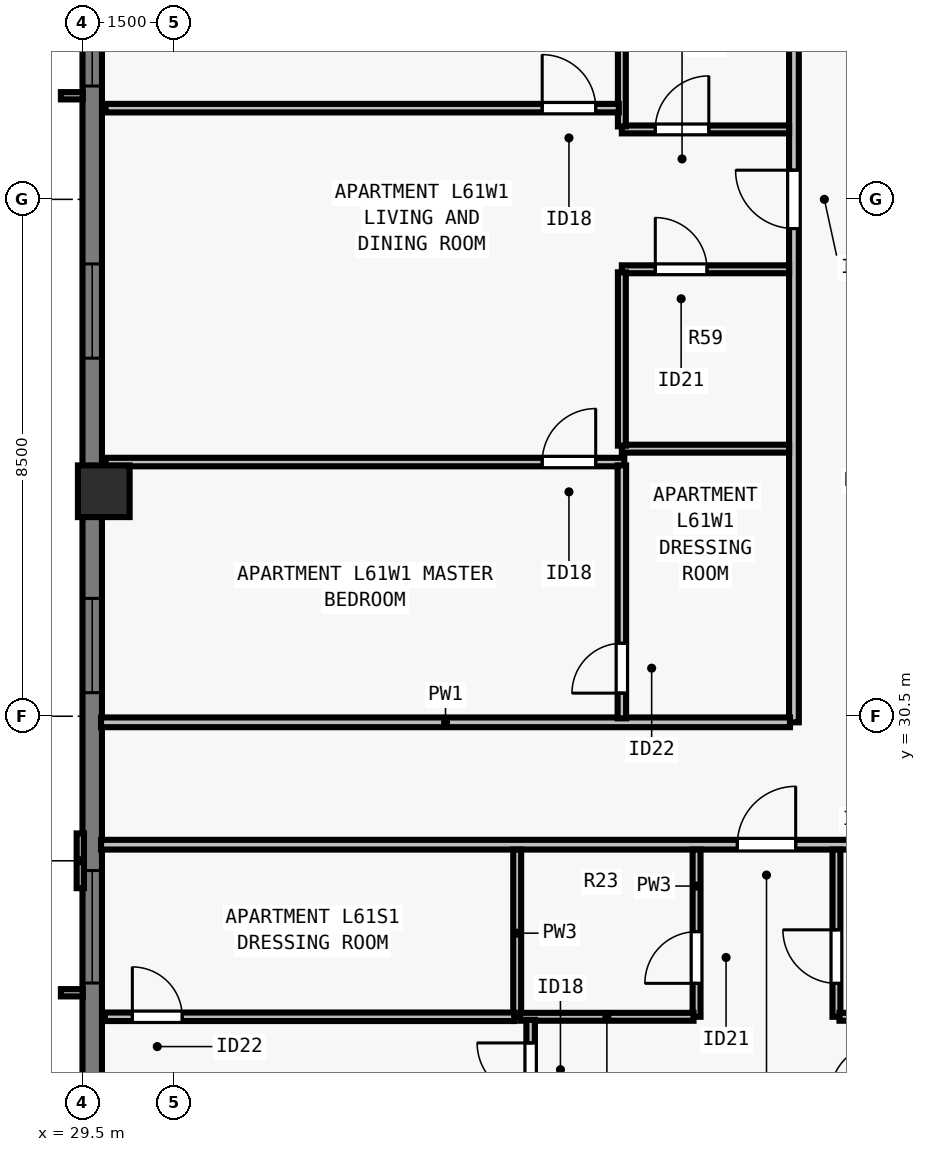
"""IFC4 building model, lengths in metres.
Left out: names, types, materials, properties, quantities, classifications, styles, units other than length and angle.
Written with IfcOpenShell. Run it as: python <this file> out.ifc"""

import sys

from ifc_helpers import new_model, si_unit, direction, frame, frame_2d, origin, origin_2d, place, context, subcontext, project, spatial, rectangle, extrude, element, fill, save


model = new_model("IFC4")
c1 = context("Model", 3, precision=1e-05, world=origin(), true_north=direction((0.0, 1.0)))
c2 = subcontext(c1, "Body", "Model", "MODEL_VIEW")
j1 = project(units=[si_unit("LENGTHUNIT", "METRE"), si_unit("PLANEANGLEUNIT", "RADIAN")], contexts=[c1])
p1 = place(None, origin())
s1 = spatial("IfcSite", under=j1, at=p1, CompositionType="ELEMENT")
p2 = place(p1, origin())
s2 = spatial("IfcBuilding", under=s1, at=p2, CompositionType="ELEMENT")
p3 = place(p2, frame((0.0, 0.0, 223.5)))
s3 = spatial("IfcBuildingStorey", under=s2, at=p3, CompositionType="ELEMENT", Elevation=223.5)
p4 = place(p3, frame((29.85, 34.2, 0.0), z_axis=(0.0, 0.0, 1.0), x_axis=(0.0, 1.0, 0.0)))
e1 = element("IfcColumn", 1, at=p4, inside=s3, PredefinedType="COLUMN", context=c2, shape_type="SweptSolid", body=[
    extrude(rectangle(XDim=0.85, YDim=0.85, at=origin_2d()), origin(), (0.0, 0.0, 1.0), 3.5),
])
p5 = place(p3, frame((29.66, 21.5, 0.0), z_axis=(0.0, 0.0, 1.0), x_axis=(0.0, 1.0, 0.0)))
e2 = element("IfcWall", 2, at=p5, inside=s3, PredefinedType="SOLIDWALL", context=c2, shape_type="SweptSolid", body=[
    extrude(rectangle(XDim=34.702, YDim=0.32, at=frame_2d((17.351, 0.0))), origin(), (0.0, 0.0, 1.0), 3.29),
])
p6 = place(p5, frame((4.613, 0.0, 0.8)))
e3 = element("IfcOpeningElement", 3, at=p6, cuts=e2, PredefinedType="OPENING", context=c2, shape_type="SweptSolid", body=[
    extrude(rectangle(XDim=1.85, YDim=1.678, at=frame_2d((0.925, 0.839))), frame((0.0, 0.17, 0.0), z_axis=(0.0, -1.0, 0.0), x_axis=(1.0, 0.0, 0.0)), (0.0, 0.0, 1.0), 0.34),
])
p7 = place(p5, frame((9.388, 0.0, 0.8)))
e4 = element("IfcOpeningElement", 4, at=p7, cuts=e2, PredefinedType="OPENING", context=c2, shape_type="SweptSolid", body=[
    extrude(rectangle(XDim=1.55, YDim=1.678, at=frame_2d((0.775, 0.839))), frame((0.0, 0.17, 0.0), z_axis=(0.0, -1.0, 0.0), x_axis=(1.0, 0.0, 0.0)), (0.0, 0.0, 1.0), 0.34),
])
p8 = place(p5, frame((14.888, 0.0, 0.8)))
e5 = element("IfcOpeningElement", 5, at=p8, cuts=e2, PredefinedType="OPENING", context=c2, shape_type="SweptSolid", body=[
    extrude(rectangle(XDim=1.55, YDim=1.678, at=frame_2d((0.775, 0.839))), frame((0.0, 0.17, 0.0), z_axis=(0.0, -1.0, 0.0), x_axis=(1.0, 0.0, 0.0)), (0.0, 0.0, 1.0), 0.34),
])
p9 = place(p5, frame((19.364, 0.0, 0.8)))
e6 = element("IfcOpeningElement", 6, at=p9, cuts=e2, PredefinedType="OPENING", context=c2, shape_type="SweptSolid", body=[
    extrude(rectangle(XDim=1.85, YDim=1.678, at=frame_2d((0.925, 0.839))), frame((0.0, 0.17, 0.0), z_axis=(0.0, -1.0, 0.0), x_axis=(1.0, 0.0, 0.0)), (0.0, 0.0, 1.0), 0.34),
])
p10 = place(p5, frame((23.614, 0.0, 0.8)))
e7 = element("IfcOpeningElement", 7, at=p10, cuts=e2, PredefinedType="OPENING", context=c2, shape_type="SweptSolid", body=[
    extrude(rectangle(XDim=1.85, YDim=1.678, at=frame_2d((0.925, 0.839))), frame((0.0, 0.17, 0.0), z_axis=(0.0, -1.0, 0.0), x_axis=(1.0, 0.0, 0.0)), (0.0, 0.0, 1.0), 0.34),
])
p11 = place(p5, frame((28.839, 0.0, 0.8)))
e8 = element("IfcOpeningElement", 8, at=p11, cuts=e2, PredefinedType="OPENING", context=c2, shape_type="SweptSolid", body=[
    extrude(rectangle(XDim=1.55, YDim=1.678, at=frame_2d((0.775, 0.839))), frame((0.0, 0.17, 0.0), z_axis=(0.0, -1.0, 0.0), x_axis=(1.0, 0.0, 0.0)), (0.0, 0.0, 1.0), 0.34),
])
p12 = place(p5, frame((31.35, 0.0, 0.8)))
e9 = element("IfcOpeningElement", 9, at=p12, cuts=e2, PredefinedType="OPENING", context=c2, shape_type="SweptSolid", body=[
    extrude(rectangle(XDim=0.9, YDim=1.678, at=frame_2d((0.45, 0.839))), frame((0.0, 0.17, 0.0), z_axis=(0.0, -1.0, 0.0), x_axis=(1.0, 0.0, 0.0)), (0.0, 0.0, 1.0), 0.34),
])
p13 = place(p3, frame((29.805, 28.387, 0.0), z_axis=(0.0, 0.0, 1.0), x_axis=(1.0, 0.0, 0.0)))
e10 = element("IfcWall", 10, at=p13, inside=s3, PredefinedType="PARTITIONING", context=c2, shape_type="SweptSolid", body=[
    extrude(rectangle(XDim=44.39, YDim=0.16, at=frame_2d((22.195, 0.0))), origin(), (0.0, 0.0, 1.0), 2.958),
])
p14 = place(p13, frame((10.464, 0.0, 0.0)))
e11 = element("IfcOpeningElement", 11, at=p14, cuts=e10, PredefinedType="OPENING", context=c2, shape_type="SweptSolid", body=[
    extrude(rectangle(XDim=0.96, YDim=2.18, at=frame_2d((0.48, 1.09))), frame((0.0, 0.09, 0.0), z_axis=(0.0, -1.0, 0.0), x_axis=(1.0, 0.0, 0.0)), (0.0, 0.0, 1.0), 0.18),
])
p15 = place(p13, frame((32.544, 0.0, 0.0)))
e12 = element("IfcOpeningElement", 12, at=p15, cuts=e10, PredefinedType="OPENING", context=c2, shape_type="SweptSolid", body=[
    extrude(rectangle(XDim=0.96, YDim=2.18, at=frame_2d((0.48, 1.09))), frame((0.0, 0.09, 0.0), z_axis=(0.0, -1.0, 0.0), x_axis=(1.0, 0.0, 0.0)), (0.0, 0.0, 1.0), 0.18),
])
p16 = place(p3, frame((41.2, 30.4, 0.0), z_axis=(0.0, 0.0, 1.0), x_axis=(0.0, 1.0, 0.0)))
e13 = element("IfcWall", 13, at=p16, inside=s3, PredefinedType="PARTITIONING", context=c2, shape_type="SweptSolid", body=[
    extrude(rectangle(XDim=17.2, YDim=0.16, at=frame_2d((8.6, 0.0))), origin(), (0.0, 0.0, 1.0), 3.29),
])
p17 = place(p16, frame((8.12, 0.0, 0.0)))
e14 = element("IfcOpeningElement", 14, at=p17, cuts=e13, PredefinedType="OPENING", context=c2, shape_type="SweptSolid", body=[
    extrude(rectangle(XDim=0.96, YDim=2.18, at=frame_2d((0.48, 1.09))), frame((0.0, 0.09, 0.0), z_axis=(0.0, -1.0, 0.0), x_axis=(1.0, 0.0, 0.0)), (0.0, 0.0, 1.0), 0.18),
])
p18 = place(p3, frame((29.805, 30.4, 0.0), z_axis=(0.0, 0.0, 1.0), x_axis=(1.0, 0.0, 0.0)))
e15 = element("IfcWall", 15, at=p18, inside=s3, PredefinedType="PARTITIONING", context=c2, shape_type="SweptSolid", body=[
    extrude(rectangle(XDim=11.33, YDim=0.16, at=frame_2d((5.665, 0.0))), origin(), (0.0, 0.0, 1.0), 3.29),
])
p19 = place(p3, frame((36.649, 25.558, 0.0), z_axis=(0.0, 0.0, 1.0), x_axis=(0.0, 1.0, 0.0)))
e16 = element("IfcWall", 16, at=p19, inside=s3, PredefinedType="PLUMBINGWALL", context=c2, shape_type="SweptSolid", body=[
    extrude(rectangle(XDim=2.75, YDim=0.13, at=frame_2d((1.375, 0.0))), origin(), (0.0, 0.0, 1.0), 3.29),
])
p20 = place(p3, frame((39.599, 25.558, 0.0), z_axis=(0.0, 0.0, 1.0), x_axis=(0.0, 1.0, 0.0)))
e17 = element("IfcWall", 17, at=p20, inside=s3, PredefinedType="PLUMBINGWALL", context=c2, shape_type="SweptSolid", body=[
    extrude(rectangle(XDim=2.75, YDim=0.13, at=frame_2d((1.375, 0.0))), origin(), (0.0, 0.0, 1.0), 3.29),
])
p21 = place(p20, frame((0.55, 0.0, 0.0)))
e18 = element("IfcOpeningElement", 18, at=p21, cuts=e17, PredefinedType="OPENING", context=c2, shape_type="SweptSolid", body=[
    extrude(rectangle(XDim=0.85, YDim=2.08, at=frame_2d((0.425, 1.04))), frame((0.0, 0.075, 0.0), z_axis=(0.0, -1.0, 0.0), x_axis=(1.0, 0.0, 0.0)), (0.0, 0.0, 1.0), 0.15),
])
p22 = place(p3, frame((36.699, 25.558, 0.0), z_axis=(0.0, 0.0, 1.0), x_axis=(1.0, 0.0, 0.0)))
e19 = element("IfcWall", 19, at=p22, inside=s3, PredefinedType="PLUMBINGWALL", context=c2, shape_type="SweptSolid", body=[
    extrude(rectangle(XDim=2.85, YDim=0.13, at=frame_2d((1.425, 0.0))), origin(), (0.0, 0.0, 1.0), 3.29),
])
p23 = place(p3, frame((41.899, 25.558, 0.0), z_axis=(0.0, 0.0, 1.0), x_axis=(0.0, 1.0, 0.0)))
e20 = element("IfcWall", 20, at=p23, inside=s3, PredefinedType="PLUMBINGWALL", context=c2, shape_type="SweptSolid", body=[
    extrude(rectangle(XDim=2.75, YDim=0.13, at=frame_2d((1.375, 0.0))), origin(), (0.0, 0.0, 1.0), 2.573),
])
p24 = place(p23, frame((0.55, 0.0, 0.0)))
e21 = element("IfcOpeningElement", 21, at=p24, cuts=e20, PredefinedType="OPENING", context=c2, shape_type="SweptSolid", body=[
    extrude(rectangle(XDim=0.88, YDim=2.1, at=frame_2d((0.44, 1.05))), frame((0.0, 0.075, 0.0), z_axis=(0.0, -1.0, 0.0), x_axis=(1.0, 0.0, 0.0)), (0.0, 0.0, 1.0), 0.15),
])
p25 = place(p3, frame((41.949, 25.558, 0.0), z_axis=(0.0, 0.0, 1.0), x_axis=(1.0, 0.0, 0.0)))
e22 = element("IfcWall", 22, at=p25, inside=s3, PredefinedType="PLUMBINGWALL", context=c2, shape_type="SweptSolid", body=[
    extrude(rectangle(XDim=3.15, YDim=0.13, at=frame_2d((1.575, 0.0))), origin(), (0.0, 0.0, 1.0), 3.29),
])
p26 = place(p3, frame((36.87, 16.88, 0.0), z_axis=(0.0, 0.0, 1.0), x_axis=(0.0, 1.0, 0.0)))
e23 = element("IfcWall", 23, at=p26, inside=s3, PredefinedType="PARTITIONING", context=c2, shape_type="SweptSolid", body=[
    extrude(rectangle(XDim=8.628, YDim=0.14, at=frame_2d((4.314, 0.0))), origin(), (0.0, 0.0, 1.0), 2.573),
])
p27 = place(p26, frame((7.367, 0.0, 0.0)))
e24 = element("IfcOpeningElement", 24, at=p27, cuts=e23, PredefinedType="OPENING", context=c2, shape_type="SweptSolid", body=[
    extrude(rectangle(XDim=0.88, YDim=2.1, at=frame_2d((0.44, 1.05))), frame((0.0, 0.08, 0.0), z_axis=(0.0, -1.0, 0.0), x_axis=(1.0, 0.0, 0.0)), (0.0, 0.0, 1.0), 0.16),
])
p28 = place(p3, frame((29.87, 25.558, 0.0), z_axis=(0.0, 0.0, 1.0), x_axis=(1.0, 0.0, 0.0)))
e25 = element("IfcWall", 25, at=p28, inside=s3, PredefinedType="PARTITIONING", context=c2, shape_type="SweptSolid", body=[
    extrude(rectangle(XDim=6.729, YDim=0.14, at=frame_2d((3.364, 0.0))), origin(), (0.0, 0.0, 1.0), 2.958),
])
p29 = place(p28, frame((0.45, 0.0, 0.0)))
e26 = element("IfcOpeningElement", 26, at=p29, cuts=e25, PredefinedType="OPENING", context=c2, shape_type="SweptSolid", body=[
    extrude(rectangle(XDim=0.82, YDim=2.1, at=frame_2d((0.41, 1.05))), frame((0.0, 0.08, 0.0), z_axis=(0.0, -1.0, 0.0), x_axis=(1.0, 0.0, 0.0)), (0.0, 0.0, 1.0), 0.16),
])
p30 = place(p3, frame((38.37, 34.9, 0.0), z_axis=(0.0, 0.0, 1.0), x_axis=(1.0, 0.0, 0.0)))
e27 = element("IfcWall", 27, at=p30, inside=s3, PredefinedType="PLUMBINGWALL", context=c2, shape_type="SweptSolid", body=[
    extrude(rectangle(XDim=2.75, YDim=0.13, at=frame_2d((1.375, 0.0))), origin(), (0.0, 0.0, 1.0), 3.29),
])
p31 = place(p3, frame((38.37, 37.85, 0.0), z_axis=(0.0, 0.0, 1.0), x_axis=(1.0, 0.0, 0.0)))
e28 = element("IfcWall", 28, at=p31, inside=s3, PredefinedType="PLUMBINGWALL", context=c2, shape_type="SweptSolid", body=[
    extrude(rectangle(XDim=2.75, YDim=0.13, at=frame_2d((1.375, 0.0))), origin(), (0.0, 0.0, 1.0), 3.29),
])
p32 = place(p31, frame((0.55, 0.0, 0.0)))
e29 = element("IfcOpeningElement", 29, at=p32, cuts=e28, PredefinedType="OPENING", context=c2, shape_type="SweptSolid", body=[
    extrude(rectangle(XDim=0.85, YDim=2.08, at=frame_2d((0.425, 1.04))), frame((0.0, 0.075, 0.0), z_axis=(0.0, -1.0, 0.0), x_axis=(1.0, 0.0, 0.0)), (0.0, 0.0, 1.0), 0.15),
])
p33 = place(p3, frame((38.37, 34.95, 0.0), z_axis=(0.0, 0.0, 1.0), x_axis=(0.0, 1.0, 0.0)))
e30 = element("IfcWall", 30, at=p33, inside=s3, PredefinedType="PLUMBINGWALL", context=c2, shape_type="SweptSolid", body=[
    extrude(rectangle(XDim=2.85, YDim=0.13, at=frame_2d((1.425, 0.0))), origin(), (0.0, 0.0, 1.0), 3.29),
])
p34 = place(p3, frame((38.37, 40.15, 0.0), z_axis=(0.0, 0.0, 1.0), x_axis=(1.0, 0.0, 0.0)))
e31 = element("IfcWall", 31, at=p34, inside=s3, PredefinedType="PLUMBINGWALL", context=c2, shape_type="SweptSolid", body=[
    extrude(rectangle(XDim=2.75, YDim=0.13, at=frame_2d((1.375, 0.0))), origin(), (0.0, 0.0, 1.0), 3.29),
])
p35 = place(p34, frame((0.55, 0.0, 0.0)))
e32 = element("IfcOpeningElement", 32, at=p35, cuts=e31, PredefinedType="OPENING", context=c2, shape_type="SweptSolid", body=[
    extrude(rectangle(XDim=0.88, YDim=2.1, at=frame_2d((0.44, 1.05))), frame((0.0, 0.075, 0.0), z_axis=(0.0, -1.0, 0.0), x_axis=(1.0, 0.0, 0.0)), (0.0, 0.0, 1.0), 0.15),
])
p36 = place(p3, frame((38.37, 40.2, 0.0), z_axis=(0.0, 0.0, 1.0), x_axis=(0.0, 1.0, 0.0)))
e33 = element("IfcWall", 33, at=p36, inside=s3, PredefinedType="PLUMBINGWALL", context=c2, shape_type="SweptSolid", body=[
    extrude(rectangle(XDim=3.15, YDim=0.13, at=frame_2d((1.575, 0.0))), origin(), (0.0, 0.0, 1.0), 3.29),
])
p37 = place(p3, frame((29.88, 34.68, 0.0), z_axis=(0.0, 0.0, 1.0), x_axis=(1.0, 0.0, 0.0)))
e34 = element("IfcWall", 34, at=p37, inside=s3, PredefinedType="PARTITIONING", context=c2, shape_type="SweptSolid", body=[
    extrude(rectangle(XDim=8.53, YDim=0.14, at=frame_2d((4.265, 0.0))), origin(), (0.0, 0.0, 1.0), 2.958),
])
p38 = place(p37, frame((7.18, 0.0, 0.0)))
e35 = element("IfcOpeningElement", 35, at=p38, cuts=e34, PredefinedType="OPENING", context=c2, shape_type="SweptSolid", body=[
    extrude(rectangle(XDim=0.88, YDim=2.1, at=frame_2d((0.44, 1.05))), frame((0.0, 0.08, 0.0), z_axis=(0.0, -1.0, 0.0), x_axis=(1.0, 0.0, 0.0)), (0.0, 0.0, 1.0), 0.16),
])
p39 = place(p3, frame((38.37, 30.465, 0.0), z_axis=(0.0, 0.0, 1.0), x_axis=(0.0, 1.0, 0.0)))
e36 = element("IfcWall", 36, at=p39, inside=s3, PredefinedType="PARTITIONING", context=c2, shape_type="SweptSolid", body=[
    extrude(rectangle(XDim=4.16, YDim=0.14, at=frame_2d((2.08, 0.0))), origin(), (0.0, 0.0, 1.0), 3.29),
])
p40 = place(p39, frame((0.415, 0.0, 0.0)))
e37 = element("IfcOpeningElement", 37, at=p40, cuts=e36, PredefinedType="OPENING", context=c2, shape_type="SweptSolid", body=[
    extrude(rectangle(XDim=0.82, YDim=2.1, at=frame_2d((0.41, 1.05))), frame((0.0, 0.08, 0.0), z_axis=(0.0, -1.0, 0.0), x_axis=(1.0, 0.0, 0.0)), (0.0, 0.0, 1.0), 0.16),
])
p41 = place(p3, frame((29.88, 40.5, 0.0), z_axis=(0.0, 0.0, 1.0), x_axis=(1.0, 0.0, 0.0)))
e38 = element("IfcWall", 38, at=p41, inside=s3, PredefinedType="PARTITIONING", context=c2, shape_type="SweptSolid", body=[
    extrude(rectangle(XDim=8.44, YDim=0.14, at=frame_2d((4.22, 0.0))), origin(), (0.0, 0.0, 1.0), 2.958),
])
p42 = place(p41, frame((7.18, 0.0, 0.0)))
e39 = element("IfcOpeningElement", 39, at=p42, cuts=e38, PredefinedType="OPENING", context=c2, shape_type="SweptSolid", body=[
    extrude(rectangle(XDim=0.88, YDim=2.1, at=frame_2d((0.44, 1.05))), frame((0.0, 0.08, 0.0), z_axis=(0.0, -1.0, 0.0), x_axis=(1.0, 0.0, 0.0)), (0.0, 0.0, 1.0), 0.16),
])
p43 = place(p6, origin())
e40 = element("IfcWindow", 40, at=p43, inside=s3, PartitioningType="SINGLE_PANEL", PredefinedType="WINDOW", context=c2, shape_type="SweptSolid", body=[
    extrude(rectangle(XDim=1.85, YDim=1.678, at=frame_2d((0.925, 0.839))), frame((0.0, -0.05, 0.0), z_axis=(0.0, -1.0, 0.0), x_axis=(1.0, 0.0, 0.0)), (0.0, 0.0, 1.0), 0.06),
])
fill(e3, e40)
p44 = place(p7, origin())
e41 = element("IfcWindow", 41, at=p44, inside=s3, PartitioningType="SINGLE_PANEL", PredefinedType="WINDOW", context=c2, shape_type="SweptSolid", body=[
    extrude(rectangle(XDim=1.55, YDim=1.678, at=frame_2d((0.775, 0.839))), frame((0.0, -0.05, 0.0), z_axis=(0.0, -1.0, 0.0), x_axis=(1.0, 0.0, 0.0)), (0.0, 0.0, 1.0), 0.06),
])
fill(e4, e41)
p45 = place(p8, origin())
e42 = element("IfcWindow", 42, at=p45, inside=s3, PartitioningType="SINGLE_PANEL", PredefinedType="WINDOW", context=c2, shape_type="SweptSolid", body=[
    extrude(rectangle(XDim=1.55, YDim=1.678, at=frame_2d((0.775, 0.839))), frame((0.0, -0.05, 0.0), z_axis=(0.0, -1.0, 0.0), x_axis=(1.0, 0.0, 0.0)), (0.0, 0.0, 1.0), 0.06),
])
fill(e5, e42)
p46 = place(p9, origin())
e43 = element("IfcWindow", 43, at=p46, inside=s3, PartitioningType="SINGLE_PANEL", PredefinedType="WINDOW", context=c2, shape_type="SweptSolid", body=[
    extrude(rectangle(XDim=1.85, YDim=1.678, at=frame_2d((0.925, 0.839))), frame((0.0, -0.05, 0.0), z_axis=(0.0, -1.0, 0.0), x_axis=(1.0, 0.0, 0.0)), (0.0, 0.0, 1.0), 0.06),
])
fill(e6, e43)
p47 = place(p21, origin())
e44 = element("IfcDoor", 44, at=p47, inside=s3, OperationType="SINGLE_SWING_LEFT", PredefinedType="DOOR", context=c2, shape_type="SweptSolid", body=[
    extrude(rectangle(XDim=0.85, YDim=2.08, at=frame_2d((0.425, 1.04))), frame((0.0, 0.025, 0.0), z_axis=(0.0, -1.0, 0.0), x_axis=(1.0, 0.0, 0.0)), (0.0, 0.0, 1.0), 0.05),
])
fill(e18, e44)
p48 = place(p24, origin())
e45 = element("IfcDoor", 45, at=p48, inside=s3, OperationType="SINGLE_SWING_RIGHT", PredefinedType="DOOR", context=c2, shape_type="SweptSolid", body=[
    extrude(rectangle(XDim=0.88, YDim=2.1, at=frame_2d((0.44, 1.05))), frame((0.0, 0.025, 0.0), z_axis=(0.0, -1.0, 0.0), x_axis=(1.0, 0.0, 0.0)), (0.0, 0.0, 1.0), 0.05),
])
fill(e21, e45)
p49 = place(p29, origin())
e46 = element("IfcDoor", 46, at=p49, inside=s3, OperationType="SINGLE_SWING_LEFT", PredefinedType="DOOR", context=c2, shape_type="SweptSolid", body=[
    extrude(rectangle(XDim=0.82, YDim=2.1, at=frame_2d((0.41, 1.05))), frame((0.0, 0.025, 0.0), z_axis=(0.0, -1.0, 0.0), x_axis=(1.0, 0.0, 0.0)), (0.0, 0.0, 1.0), 0.05),
])
fill(e26, e46)
p50 = place(p27, origin())
e47 = element("IfcDoor", 47, at=p50, inside=s3, OperationType="SINGLE_SWING_RIGHT", PredefinedType="DOOR", context=c2, shape_type="SweptSolid", body=[
    extrude(rectangle(XDim=0.88, YDim=2.1, at=frame_2d((0.44, 1.05))), frame((0.0, 0.025, 0.0), z_axis=(0.0, -1.0, 0.0), x_axis=(1.0, 0.0, 0.0)), (0.0, 0.0, 1.0), 0.05),
])
fill(e24, e47)
p51 = place(p14, origin())
e48 = element("IfcDoor", 48, at=p51, inside=s3, OperationType="SINGLE_SWING_RIGHT", PredefinedType="DOOR", context=c2, shape_type="SweptSolid", body=[
    extrude(rectangle(XDim=0.96, YDim=2.18, at=frame_2d((0.48, 1.09))), frame((0.0, 0.025, 0.0), z_axis=(0.0, -1.0, 0.0), x_axis=(1.0, 0.0, 0.0)), (0.0, 0.0, 1.0), 0.05),
])
fill(e11, e48)
p52 = place(p32, origin())
e49 = element("IfcDoor", 49, at=p52, inside=s3, OperationType="SINGLE_SWING_LEFT", PredefinedType="DOOR", context=c2, shape_type="SweptSolid", body=[
    extrude(rectangle(XDim=0.85, YDim=2.08, at=frame_2d((0.425, 1.04))), frame((0.0, 0.025, 0.0), z_axis=(0.0, -1.0, 0.0), x_axis=(1.0, 0.0, 0.0)), (0.0, 0.0, 1.0), 0.05),
])
fill(e29, e49)
p53 = place(p35, origin())
e50 = element("IfcDoor", 50, at=p53, inside=s3, OperationType="SINGLE_SWING_RIGHT", PredefinedType="DOOR", context=c2, shape_type="SweptSolid", body=[
    extrude(rectangle(XDim=0.88, YDim=2.1, at=frame_2d((0.44, 1.05))), frame((0.0, 0.025, 0.0), z_axis=(0.0, -1.0, 0.0), x_axis=(1.0, 0.0, 0.0)), (0.0, 0.0, 1.0), 0.05),
])
fill(e32, e50)
p54 = place(p40, origin())
e51 = element("IfcDoor", 51, at=p54, inside=s3, OperationType="SINGLE_SWING_LEFT", PredefinedType="DOOR", context=c2, shape_type="SweptSolid", body=[
    extrude(rectangle(XDim=0.82, YDim=2.1, at=frame_2d((0.41, 1.05))), frame((0.0, 0.025, 0.0), z_axis=(0.0, -1.0, 0.0), x_axis=(1.0, 0.0, 0.0)), (0.0, 0.0, 1.0), 0.05),
])
fill(e37, e51)
p55 = place(p38, origin())
e52 = element("IfcDoor", 52, at=p55, inside=s3, OperationType="SINGLE_SWING_RIGHT", PredefinedType="DOOR", context=c2, shape_type="SweptSolid", body=[
    extrude(rectangle(XDim=0.88, YDim=2.1, at=frame_2d((0.44, 1.05))), frame((0.0, 0.025, 0.0), z_axis=(0.0, -1.0, 0.0), x_axis=(1.0, 0.0, 0.0)), (0.0, 0.0, 1.0), 0.05),
])
fill(e35, e52)
p56 = place(p42, origin())
e53 = element("IfcDoor", 53, at=p56, inside=s3, OperationType="SINGLE_SWING_LEFT", PredefinedType="DOOR", context=c2, shape_type="SweptSolid", body=[
    extrude(rectangle(XDim=0.88, YDim=2.1, at=frame_2d((0.44, 1.05))), frame((0.0, 0.025, 0.0), z_axis=(0.0, -1.0, 0.0), x_axis=(1.0, 0.0, 0.0)), (0.0, 0.0, 1.0), 0.05),
])
fill(e39, e53)
p57 = place(p17, origin())
e54 = element("IfcDoor", 54, at=p57, inside=s3, OperationType="SINGLE_SWING_RIGHT", PredefinedType="DOOR", context=c2, shape_type="SweptSolid", body=[
    extrude(rectangle(XDim=0.96, YDim=2.18, at=frame_2d((0.48, 1.09))), frame((0.0, 0.025, 0.0), z_axis=(0.0, -1.0, 0.0), x_axis=(1.0, 0.0, 0.0)), (0.0, 0.0, 1.0), 0.05),
])
fill(e14, e54)
save(model, sys.argv[1])
